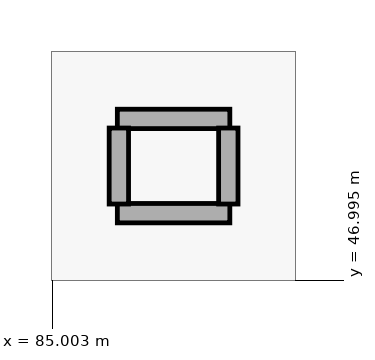
"""IFC4 building model, lengths in metres.
Left out: names, types, materials, properties, quantities, classifications, styles, units other than length and angle.
Written with IfcOpenShell. Run it as: python <this file> out.ifc"""

import sys

from ifc_helpers import new_model, si_unit, direction, frame, frame_2d, origin, place, context, subcontext, project, spatial, rectangle, extrude, element, save


model = new_model("IFC4")
c1 = context("Model", 3, precision=1e-05, world=origin(), true_north=direction((0.0, 1.0)))
c2 = subcontext(c1, "Body", "Model", "MODEL_VIEW")
j1 = project(units=[si_unit("LENGTHUNIT", "METRE"), si_unit("PLANEANGLEUNIT", "RADIAN")], contexts=[c1])
p1 = place(None, origin())
s1 = spatial("IfcSite", under=j1, at=p1, CompositionType="ELEMENT")
p2 = place(p1, origin())
s2 = spatial("IfcBuilding", under=s1, at=p2, CompositionType="ELEMENT")
p3 = place(p2, frame((0.0, 0.0, 5.4)))
s3 = spatial("IfcBuildingStorey", under=s2, at=p3, CompositionType="ELEMENT", Elevation=5.4)
for number, where, z_axis, x_axis in (
    (1, (85.86, 49.12, 0.0), (0.0, 0.0, 1.0), (1.0, 0.0, 0.0)),
    (2, (85.86, 47.88, 0.0), (0.0, 0.0, 1.0), (1.0, 0.0, 0.0)),
):
    element("IfcWall", number, at=place(p3, frame(where, z_axis=z_axis, x_axis=x_axis)), inside=s3, PredefinedType="PARTITIONING", context=c2, shape_type="SweptSolid", body=[
        extrude(rectangle(XDim=1.48, YDim=0.255, at=frame_2d((0.74, 0.0))), origin(), (0.0, 0.0, 1.0), 4.4),
    ])
p4 = place(p3, frame((85.88, 48.0, 0.0), z_axis=(0.0, 0.0, 1.0), x_axis=(0.0, 1.0, 0.0)))
e3 = element("IfcWall", 3, at=p4, inside=s3, PredefinedType="PARTITIONING", context=c2, shape_type="SweptSolid", body=[
    extrude(rectangle(XDim=1.0, YDim=0.255, at=frame_2d((0.5, 0.0))), origin(), (0.0, 0.0, 1.0), 4.4),
])
p5 = place(p3, frame((87.32, 48.0, 0.0), z_axis=(0.0, 0.0, 1.0), x_axis=(0.0, 1.0, 0.0)))
e4 = element("IfcWall", 4, at=p5, inside=s3, PredefinedType="PARTITIONING", context=c2, shape_type="SweptSolid", body=[
    extrude(rectangle(XDim=1.0, YDim=0.255, at=frame_2d((0.5, 0.0))), origin(), (0.0, 0.0, 1.0), 4.72),
])
save(model, sys.argv[1])
